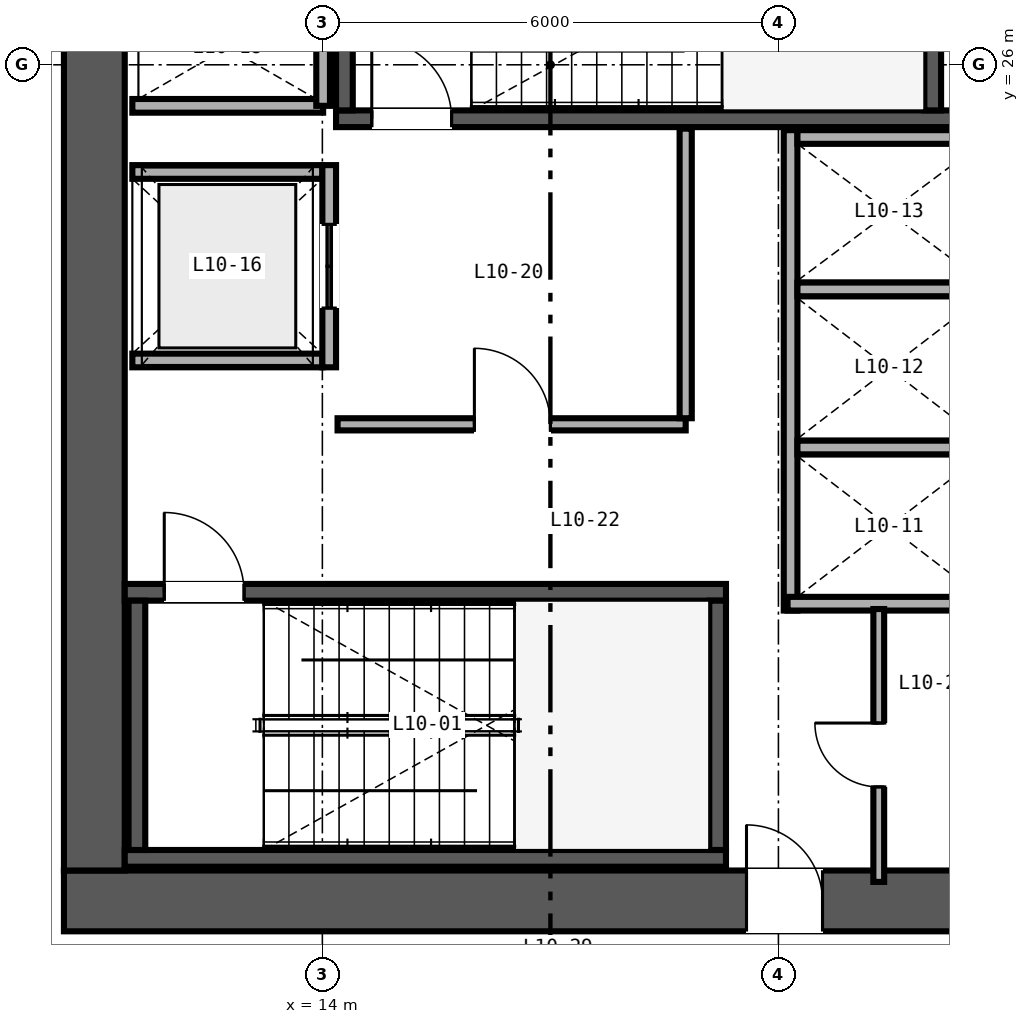
"""IFC4 building model, lengths in metres.
Left out: names, types, materials, properties, quantities, classifications, styles, units other than length and angle.
Written with IfcOpenShell. Run it as: python <this file> out.ifc"""

import sys

from ifc_helpers import new_model, si_unit, direction, frame, frame_2d, origin, place, context, subcontext, project, spatial, rectangle, extrude, source, transform, mapped, element, fill, save


model = new_model("IFC4")
c1 = context("Model", 3, precision=1e-05, world=origin(), true_north=direction((0.0, 1.0)))
c2 = subcontext(c1, "Body", "Model", "MODEL_VIEW")
j1 = project(units=[si_unit("LENGTHUNIT", "METRE"), si_unit("PLANEANGLEUNIT", "RADIAN")], contexts=[c1])
p1 = place(None, origin())
s1 = spatial("IfcSite", under=j1, at=p1, CompositionType="ELEMENT")
p2 = place(p1, origin())
s2 = spatial("IfcBuilding", under=s1, at=p2, CompositionType="ELEMENT")
p3 = place(p2, frame((0.0, 0.0, 45.6)))
s3 = spatial("IfcBuildingStorey", under=s2, at=p3, CompositionType="ELEMENT", Elevation=45.6)
p4 = place(p3, frame((10.6, 15.0, 0.0), z_axis=(0.0, 0.0, 1.0), x_axis=(1.0, 0.0, 0.0)))
e1 = element("IfcWall", 1, at=p4, inside=s3, PredefinedType="SHEAR", context=c2, shape_type="SweptSolid", body=[
    extrude(rectangle(XDim=12.8, YDim=0.8, at=frame_2d((6.4, 0.0))), origin(), (0.0, 0.0, 1.0), 3.35),
])
p5 = place(p4, frame((8.98, 0.0, 0.0)))
e2 = element("IfcOpeningElement", 2, at=p5, cuts=e1, PredefinedType="OPENING", context=c2, shape_type="SweptSolid", body=[
    extrude(rectangle(XDim=1.0, YDim=2.15, at=frame_2d((0.5, 1.075))), frame((0.0, 0.41, 0.0), z_axis=(0.0, -1.0, 0.0), x_axis=(1.0, 0.0, 0.0)), (0.0, 0.0, 1.0), 0.82),
])
p6 = place(p3, frame((11.0, 15.4, 0.0), z_axis=(0.0, 0.0, 1.0), x_axis=(0.0, 1.0, 0.0)))
e3 = element("IfcWall", 3, at=p6, inside=s3, PredefinedType="SHEAR", context=c2, shape_type="SweptSolid", body=[
    extrude(rectangle(XDim=21.2, YDim=0.8, at=frame_2d((10.6, 0.0))), origin(), (0.0, 0.0, 1.0), 3.35),
])
p7 = place(p3, frame((11.4, 15.56, 0.0), z_axis=(0.0, 0.0, 1.0), x_axis=(1.0, 0.0, 0.0)))
e4 = element("IfcWall", 4, at=p7, inside=s3, PredefinedType="SHEAR", context=c2, shape_type="SweptSolid", body=[
    extrude(rectangle(XDim=7.91, YDim=0.22, at=frame_2d((3.955, 0.0))), origin(), (0.0, 0.0, 1.0), 3.4),
])
p8 = place(p3, frame((11.4, 19.06, 0.0), z_axis=(0.0, 0.0, 1.0), x_axis=(1.0, 0.0, 0.0)))
e5 = element("IfcWall", 5, at=p8, inside=s3, PredefinedType="SHEAR", context=c2, shape_type="SweptSolid", body=[
    extrude(rectangle(XDim=7.91, YDim=0.22, at=frame_2d((3.955, 0.0))), origin(), (0.0, 0.0, 1.0), 3.4),
])
p9 = place(p8, frame((0.52, 0.0, 0.0)))
e6 = element("IfcOpeningElement", 6, at=p9, cuts=e5, PredefinedType="OPENING", context=c2, shape_type="SweptSolid", body=[
    extrude(rectangle(XDim=1.05, YDim=2.15, at=frame_2d((0.525, 1.075))), frame((0.0, 0.12, 0.0), z_axis=(0.0, -1.0, 0.0), x_axis=(1.0, 0.0, 0.0)), (0.0, 0.0, 1.0), 0.24),
])
for number, where, z_axis, x_axis in (
    (7, (11.56, 15.67, 0.0), (0.0, 0.0, 1.0), (0.0, 1.0, 0.0)),
    (8, (19.2, 15.67, 0.0), (0.0, 0.0, 1.0), (0.0, 1.0, 0.0)),
):
    element("IfcWall", number, at=place(p3, frame(where, z_axis=z_axis, x_axis=x_axis)), inside=s3, PredefinedType="SHEAR", context=c2, shape_type="SweptSolid", body=[
        extrude(rectangle(XDim=3.28, YDim=0.22, at=frame_2d((1.64, 0.0))), origin(), (0.0, 0.0, 1.0), 3.4),
    ])
p10 = place(p3, frame((14.18, 25.29, 0.0), z_axis=(0.0, 0.0, 1.0), x_axis=(1.0, 0.0, 0.0)))
e9 = element("IfcWall", 9, at=p10, inside=s3, PredefinedType="SHEAR", context=c2, shape_type="SweptSolid", body=[
    extrude(rectangle(XDim=8.42, YDim=0.22, at=frame_2d((4.21, 0.0))), origin(), (0.0, 0.0, 1.0), 3.4),
])
p11 = place(p10, frame((0.47, 0.0, 0.0)))
e10 = element("IfcOpeningElement", 10, at=p11, cuts=e9, PredefinedType="OPENING", context=c2, shape_type="SweptSolid", body=[
    extrude(rectangle(XDim=1.05, YDim=2.15, at=frame_2d((0.525, 1.075))), frame((0.0, 0.12, 0.0), z_axis=(0.0, -1.0, 0.0), x_axis=(1.0, 0.0, 0.0)), (0.0, 0.0, 1.0), 0.24),
])
for number, where, z_axis, x_axis in (
    (11, (14.29, 25.4, 0.0), (0.0, 0.0, 1.0), (0.0, 1.0, 0.0)),
    (12, (22.03, 25.4, 0.0), (0.0, 0.0, 1.0), (0.0, 1.0, 0.0)),
):
    element("IfcWall", number, at=place(p3, frame(where, z_axis=z_axis, x_axis=x_axis)), inside=s3, PredefinedType="SHEAR", context=c2, shape_type="SweptSolid", body=[
        extrude(rectangle(XDim=3.28, YDim=0.22, at=frame_2d((1.64, 0.0))), origin(), (0.0, 0.0, 1.0), 3.4),
    ])
p12 = place(p3, frame((20.16, 18.82, 0.0), z_axis=(0.0, 0.0, 1.0), x_axis=(0.0, 1.0, 0.0)))
e13 = element("IfcWall", 13, at=p12, inside=s3, PredefinedType="SOLIDWALL", context=c2, shape_type="SweptSolid", body=[
    extrude(rectangle(XDim=6.32, YDim=0.18, at=frame_2d((3.16, 0.0))), origin(), (0.0, 0.0, 1.0), 2.36),
])
p13 = place(p3, frame((20.12, 18.91, 0.0), z_axis=(0.0, 0.0, 1.0), x_axis=(1.0, 0.0, 0.0)))
e14 = element("IfcWall", 14, at=p13, inside=s3, PredefinedType="SOLIDWALL", context=c2, shape_type="SweptSolid", body=[
    extrude(rectangle(XDim=2.63, YDim=0.18, at=frame_2d((1.315, 0.0))), origin(), (0.0, 0.0, 1.0), 3.35),
])
p14 = place(p3, frame((20.25, 25.05, 0.0), z_axis=(0.0, 0.0, 1.0), x_axis=(1.0, 0.0, 0.0)))
e15 = element("IfcWall", 15, at=p14, inside=s3, PredefinedType="SOLIDWALL", context=c2, shape_type="SweptSolid", body=[
    extrude(rectangle(XDim=2.36, YDim=0.18, at=frame_2d((1.18, 0.0))), origin(), (0.0, 0.0, 1.0), 3.35),
])
p15 = place(p3, frame((20.25, 20.965, 0.0), z_axis=(0.0, 0.0, 1.0), x_axis=(1.0, 0.0, 0.0)))
e16 = element("IfcWall", 16, at=p15, inside=s3, PredefinedType="SOLIDWALL", context=c2, shape_type="SweptSolid", body=[
    extrude(rectangle(XDim=2.36, YDim=0.18, at=frame_2d((1.18, 0.0))), origin(), (0.0, 0.0, 1.0), 2.36),
])
p16 = place(p3, frame((20.25, 23.045, 0.0), z_axis=(0.0, 0.0, 1.0), x_axis=(1.0, 0.0, 0.0)))
e17 = element("IfcWall", 17, at=p16, inside=s3, PredefinedType="SOLIDWALL", context=c2, shape_type="SweptSolid", body=[
    extrude(rectangle(XDim=2.36, YDim=0.18, at=frame_2d((1.18, 0.0))), origin(), (0.0, 0.0, 1.0), 3.35),
])
for number, where, z_axis, x_axis in (
    (18, (11.5, 22.11, 0.0), (0.0, 0.0, 1.0), (1.0, 0.0, 0.0)),
    (19, (11.5, 24.59, 0.0), (0.0, 0.0, 1.0), (1.0, 0.0, 0.0)),
):
    element("IfcWall", number, at=place(p3, frame(where, z_axis=z_axis, x_axis=x_axis)), inside=s3, PredefinedType="SOLIDWALL", context=c2, shape_type="SweptSolid", body=[
        extrude(rectangle(XDim=2.5, YDim=0.18, at=frame_2d((1.25, 0.0))), origin(), (0.0, 0.0, 1.0), 3.35),
    ])
p17 = place(p3, frame((14.09, 22.02, 0.0), z_axis=(0.0, 0.0, 1.0), x_axis=(0.0, 1.0, 0.0)))
e20 = element("IfcWall", 20, at=p17, inside=s3, PredefinedType="SOLIDWALL", context=c2, shape_type="SweptSolid", body=[
    extrude(rectangle(XDim=2.66, YDim=0.18, at=frame_2d((1.33, 0.0))), origin(), (0.0, 0.0, 1.0), 3.35),
])
p18 = place(p17, frame((0.78, 0.0, 0.0)))
e21 = element("IfcOpeningElement", 21, at=p18, cuts=e20, PredefinedType="OPENING", context=c2, shape_type="SweptSolid", body=[
    extrude(rectangle(XDim=1.1, YDim=2.2, at=frame_2d((0.55, 1.1))), frame((0.0, 0.1, 0.0), z_axis=(0.0, -1.0, 0.0), x_axis=(1.0, 0.0, 0.0)), (0.0, 0.0, 1.0), 0.2),
])
p19 = place(p3, frame((11.5, 25.46, 0.0), z_axis=(0.0, 0.0, 1.0), x_axis=(1.0, 0.0, 0.0)))
e22 = element("IfcWall", 22, at=p19, inside=s3, PredefinedType="SOLIDWALL", context=c2, shape_type="SweptSolid", body=[
    extrude(rectangle(XDim=2.51, YDim=0.18, at=frame_2d((1.255, 0.0))), origin(), (0.0, 0.0, 1.0), 3.35),
])
p20 = place(p3, frame((14.01, 25.46, 0.0), z_axis=(0.0, 0.0, 1.0), x_axis=(0.0, 1.0, 0.0)))
e23 = element("IfcWall", 23, at=p20, inside=s3, PredefinedType="SOLIDWALL", context=c2, shape_type="SweptSolid", body=[
    extrude(rectangle(XDim=3.08, YDim=0.18, at=frame_2d((1.54, 0.0))), origin(), (0.0, 0.0, 1.0), 3.35),
])
p21 = place(p3, frame((14.2, 21.27, 0.0), z_axis=(0.0, 0.0, 1.0), x_axis=(1.0, 0.0, 0.0)))
e24 = element("IfcWall", 24, at=p21, inside=s3, PredefinedType="PARTITIONING", context=c2, shape_type="SweptSolid", body=[
    extrude(rectangle(XDim=4.58, YDim=0.16, at=frame_2d((2.29, 0.0))), origin(), (0.0, 0.0, 1.0), 3.35),
])
p22 = place(p21, frame((1.8, 0.0, 0.0)))
e25 = element("IfcOpeningElement", 25, at=p22, cuts=e24, PredefinedType="OPENING", context=c2, shape_type="SweptSolid", body=[
    extrude(rectangle(XDim=1.0, YDim=2.15, at=frame_2d((0.5, 1.075))), frame((0.0, 0.09, 0.0), z_axis=(0.0, -1.0, 0.0), x_axis=(1.0, 0.0, 0.0)), (0.0, 0.0, 1.0), 0.18),
])
p23 = place(p3, frame((18.78, 21.35, 0.0), z_axis=(0.0, 0.0, 1.0), x_axis=(0.0, 1.0, 0.0)))
e26 = element("IfcWall", 26, at=p23, inside=s3, PredefinedType="PARTITIONING", context=c2, shape_type="SweptSolid", body=[
    extrude(rectangle(XDim=3.81, YDim=0.16, at=frame_2d((1.905, 0.0))), origin(), (0.0, 0.0, 1.0), 3.35),
])
p24 = place(p3, frame((21.32, 15.25, 0.0), z_axis=(0.0, 0.0, 1.0), x_axis=(0.0, 1.0, 0.0)))
e27 = element("IfcWall", 27, at=p24, inside=s3, PredefinedType="PARTITIONING", context=c2, shape_type="SweptSolid", body=[
    extrude(rectangle(XDim=3.59, YDim=0.142, at=frame_2d((1.795, 0.0))), origin(), (0.0, 0.0, 1.0), 3.35),
])
p25 = place(p24, frame((1.25, 0.0, 0.0)))
e28 = element("IfcOpeningElement", 28, at=p25, cuts=e27, PredefinedType="OPENING", context=c2, shape_type="SweptSolid", body=[
    extrude(rectangle(XDim=0.84, YDim=2.1, at=frame_2d((0.42, 1.05))), frame((0.0, 0.081, 0.0), z_axis=(0.0, -1.0, 0.0), x_axis=(1.0, 0.0, 0.0)), (0.0, 0.0, 1.0), 0.162),
])
m1 = source(origin(), c2, "Body", "SweptSolid", [
    extrude(rectangle(XDim=1.05, YDim=2.15, at=frame_2d((0.525, 1.075))), frame((0.0, 0.025, 0.0), z_axis=(0.0, -1.0, 0.0), x_axis=(1.0, 0.0, 0.0)), (0.0, 0.0, 1.0), 0.05),
])
p26 = place(p9, origin())
e29 = element("IfcDoor", 29, at=p26, inside=s3, OperationType="SINGLE_SWING_LEFT", PredefinedType="DOOR", context=c2, shape_type="MappedRepresentation", body=[
    mapped(m1, transform((0.0, 0.0, 0.0), scale=1.0)),
])
fill(e6, e29)
p27 = place(p11, origin())
e30 = element("IfcDoor", 30, at=p27, inside=s3, OperationType="SINGLE_SWING_LEFT", PredefinedType="DOOR", context=c2, shape_type="MappedRepresentation", body=[
    mapped(m1, transform((0.0, 0.0, 0.0), scale=1.0)),
])
fill(e10, e30)
m2 = source(origin(), c2, "Body", "SweptSolid", [
    extrude(rectangle(XDim=1.1, YDim=2.2, at=frame_2d((0.55, 1.1))), frame((0.0, 0.025, 0.0), z_axis=(0.0, -1.0, 0.0), x_axis=(1.0, 0.0, 0.0)), (0.0, 0.0, 1.0), 0.05),
])
p28 = place(p18, origin())
e31 = element("IfcDoor", 31, at=p28, inside=s3, OperationType="DOUBLE_DOOR_SLIDING", PredefinedType="DOOR", context=c2, shape_type="MappedRepresentation", body=[
    mapped(m2, transform((0.0, 0.0, 0.0), scale=1.0)),
])
fill(e21, e31)
m3 = source(origin(), c2, "Body", "SweptSolid", [
    extrude(rectangle(XDim=1.0, YDim=2.15, at=frame_2d((0.5, 1.075))), frame((0.0, 0.025, 0.0), z_axis=(0.0, -1.0, 0.0), x_axis=(1.0, 0.0, 0.0)), (0.0, 0.0, 1.0), 0.05),
])
p29 = place(p22, origin())
e32 = element("IfcDoor", 32, at=p29, inside=s3, OperationType="SINGLE_SWING_LEFT", PredefinedType="DOOR", context=c2, shape_type="MappedRepresentation", body=[
    mapped(m3, transform((0.0, 0.0, 0.0), scale=1.0)),
])
fill(e25, e32)
m4 = source(origin(), c2, "Body", "SweptSolid", [
    extrude(rectangle(XDim=0.84, YDim=2.1, at=frame_2d((0.42, 1.05))), frame((0.0, 0.025, 0.0), z_axis=(0.0, -1.0, 0.0), x_axis=(1.0, 0.0, 0.0)), (0.0, 0.0, 1.0), 0.05),
])
p30 = place(p25, origin())
e33 = element("IfcDoor", 33, at=p30, inside=s3, OperationType="SINGLE_SWING_RIGHT", PredefinedType="DOOR", context=c2, shape_type="MappedRepresentation", body=[
    mapped(m4, transform((0.0, 0.0, 0.0), scale=1.0)),
])
fill(e28, e33)
p31 = place(p5, origin())
e34 = element("IfcDoor", 34, at=p31, inside=s3, OperationType="SINGLE_SWING_LEFT", PredefinedType="DOOR", context=c2, shape_type="MappedRepresentation", body=[
    mapped(m3, transform((0.0, 0.0, 0.0), scale=1.0)),
])
fill(e2, e34)
save(model, sys.argv[1])
